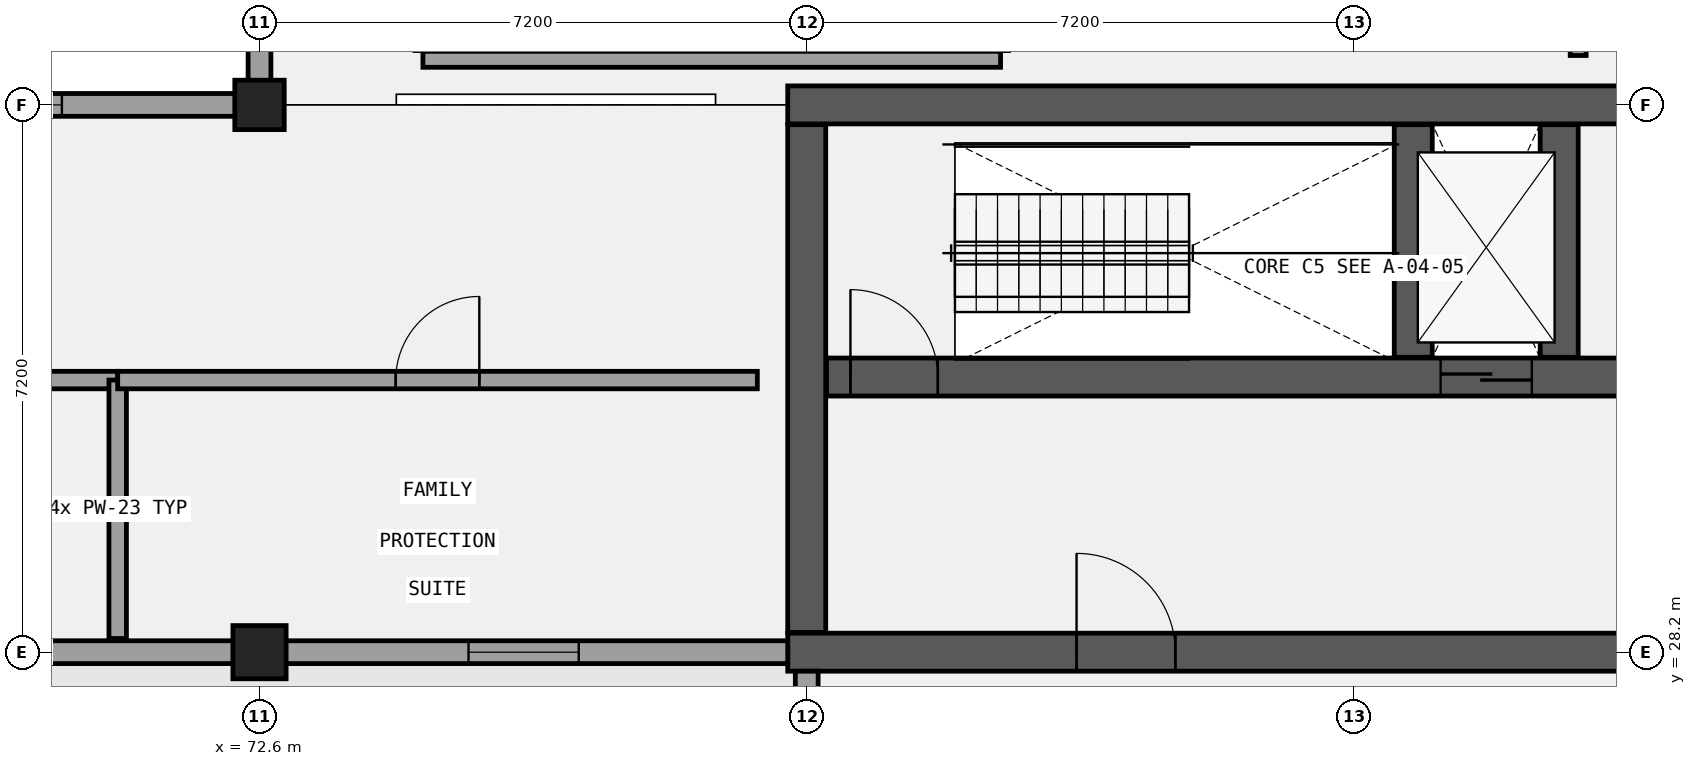
"""IFC4 building model, lengths in metres.
Left out: names, types, materials, properties, quantities, classifications, styles, units other than length and angle.
Written with IfcOpenShell. Run it as: python <this file> out.ifc"""

import sys

from ifc_helpers import new_model, si_unit, direction, frame, frame_2d, origin, origin_2d, place, context, subcontext, project, spatial, rectangle, circle, extrude, element, fill, save


model = new_model("IFC4")
c1 = context("Model", 3, precision=1e-05, world=origin(), true_north=direction((0.0, 1.0)))
c2 = subcontext(c1, "Body", "Model", "MODEL_VIEW")
j1 = project(units=[si_unit("LENGTHUNIT", "METRE"), si_unit("PLANEANGLEUNIT", "RADIAN")], contexts=[c1])
p1 = place(None, origin())
s1 = spatial("IfcSite", under=j1, at=p1, CompositionType="ELEMENT")
p2 = place(p1, origin())
s2 = spatial("IfcBuilding", under=s1, at=p2, CompositionType="ELEMENT")
p3 = place(p2, frame((0.0, 0.0, 5.4)))
s3 = spatial("IfcBuildingStorey", under=s2, at=p3, CompositionType="ELEMENT", Elevation=5.4)
p4 = place(p3, frame((79.55, 35.4, 0.0), z_axis=(0.0, 0.0, 1.0), x_axis=(1.0, 0.0, 0.0)))
e1 = element("IfcWall", 1, at=p4, inside=s3, PredefinedType="SHEAR", context=c2, shape_type="SweptSolid", body=[
    extrude(rectangle(XDim=14.9, YDim=0.5, at=frame_2d((7.45, 0.0))), origin(), (0.0, 0.0, 1.0), 4.2),
])
p5 = place(p3, frame((79.55, 28.2, 0.0), z_axis=(0.0, 0.0, 1.0), x_axis=(1.0, 0.0, 0.0)))
e2 = element("IfcWall", 2, at=p5, inside=s3, PredefinedType="SHEAR", context=c2, shape_type="SweptSolid", body=[
    extrude(rectangle(XDim=14.9, YDim=0.5, at=frame_2d((7.45, 0.0))), origin(), (0.0, 0.0, 1.0), 4.2),
])
p6 = place(p5, frame((3.8, 0.0, 0.0)))
e3 = element("IfcOpeningElement", 3, at=p6, cuts=e2, PredefinedType="OPENING", context=c2, shape_type="SweptSolid", body=[
    extrude(rectangle(XDim=1.3, YDim=2.2, at=frame_2d((0.65, 1.1))), frame((0.0, 0.26, 0.0), z_axis=(0.0, -1.0, 0.0), x_axis=(1.0, 0.0, 0.0)), (0.0, 0.0, 1.0), 0.52),
])
p7 = place(p3, frame((79.8, 28.46, 0.0), z_axis=(0.0, 0.0, 1.0), x_axis=(0.0, 1.0, 0.0)))
e4 = element("IfcWall", 4, at=p7, inside=s3, PredefinedType="SHEAR", context=c2, shape_type="SweptSolid", body=[
    extrude(rectangle(XDim=6.68, YDim=0.5, at=frame_2d((3.34, 0.0))), origin(), (0.0, 0.0, 1.0), 4.2),
])
p8 = place(p3, frame((80.06, 31.82, 0.0), z_axis=(0.0, 0.0, 1.0), x_axis=(1.0, 0.0, 0.0)))
e5 = element("IfcWall", 5, at=p8, inside=s3, PredefinedType="SHEAR", context=c2, shape_type="SweptSolid", body=[
    extrude(rectangle(XDim=13.88, YDim=0.5, at=frame_2d((6.94, 0.0))), origin(), (0.0, 0.0, 1.0), 4.2),
])
p9 = place(p8, frame((8.08, 0.0, 0.0)))
e6 = element("IfcOpeningElement", 6, at=p9, cuts=e5, PredefinedType="OPENING", context=c2, shape_type="SweptSolid", body=[
    extrude(rectangle(XDim=1.2, YDim=2.15, at=frame_2d((0.6, 1.075))), frame((0.0, 0.26, 0.0), z_axis=(0.0, -1.0, 0.0), x_axis=(1.0, 0.0, 0.0)), (0.0, 0.0, 1.0), 0.52),
])
p10 = place(p8, frame((0.315, 0.0, 0.0)))
e7 = element("IfcOpeningElement", 7, at=p10, cuts=e5, PredefinedType="OPENING", context=c2, shape_type="SweptSolid", body=[
    extrude(rectangle(XDim=1.15, YDim=2.15, at=frame_2d((0.575, 1.075))), frame((0.0, 0.26, 0.0), z_axis=(0.0, -1.0, 0.0), x_axis=(1.0, 0.0, 0.0)), (0.0, 0.0, 1.0), 0.52),
])
for number, where, z_axis, x_axis in (
    (8, (87.78, 32.08, 0.0), (0.0, 0.0, 1.0), (0.0, 1.0, 0.0)),
    (9, (89.7, 32.08, 0.0), (0.0, 0.0, 1.0), (0.0, 1.0, 0.0)),
):
    element("IfcWall", number, at=place(p3, frame(where, z_axis=z_axis, x_axis=x_axis)), inside=s3, PredefinedType="SHEAR", context=c2, shape_type="SweptSolid", body=[
        extrude(rectangle(XDim=3.06, YDim=0.5, at=frame_2d((1.53, 0.0))), origin(), (0.0, 0.0, 1.0), 4.2),
    ])
p11 = place(p3, frame((72.6, 28.2, 0.0), z_axis=(0.0, 0.0, 1.0), x_axis=(1.0, 0.0, 0.0)))
e10 = element("IfcColumn", 10, at=p11, inside=s3, PredefinedType="COLUMN", context=c2, shape_type="SweptSolid", body=[
    extrude(rectangle(XDim=0.7, YDim=0.7, at=origin_2d()), origin(), (0.0, 0.0, 1.0), 4.2),
])
p12 = place(p3, frame((72.6, 35.4, 0.0), z_axis=(0.0, 0.0, 1.0), x_axis=(1.0, 0.0, 0.0)))
e11 = element("IfcColumn", 11, at=p12, inside=s3, PredefinedType="COLUMN", context=c2, shape_type="SweptSolid", body=[
    extrude(circle(Radius=0.325, at=origin_2d()), origin(), (0.0, 0.0, 1.0), 4.2),
])
p13 = place(p3, frame((79.8, 27.95, 0.0), z_axis=(0.0, 0.0, 1.0), x_axis=(0.0, -1.0, 0.0)))
e12 = element("IfcWall", 12, at=p13, inside=s3, PredefinedType="SOLIDWALL", context=c2, shape_type="SweptSolid", body=[
    extrude(rectangle(XDim=21.2, YDim=0.3, at=frame_2d((10.6, 0.0))), origin(), (0.0, 0.0, 1.0), 3.27),
])
p14 = place(p13, frame((17.1, 0.0, 1.0)))
e13 = element("IfcOpeningElement", 13, at=p14, cuts=e12, PredefinedType="OPENING", context=c2, shape_type="SweptSolid", body=[
    extrude(rectangle(XDim=1.15, YDim=1.65, at=frame_2d((0.575, 0.825))), frame((0.0, 0.16, 0.0), z_axis=(0.0, -1.0, 0.0), x_axis=(1.0, 0.0, 0.0)), (0.0, 0.0, 1.0), 0.32),
])
p15 = place(p13, frame((9.975, 0.0, 1.0)))
e14 = element("IfcOpeningElement", 14, at=p15, cuts=e12, PredefinedType="OPENING", context=c2, shape_type="SweptSolid", body=[
    extrude(rectangle(XDim=1.15, YDim=1.65, at=frame_2d((0.575, 0.825))), frame((0.0, 0.16, 0.0), z_axis=(0.0, -1.0, 0.0), x_axis=(1.0, 0.0, 0.0)), (0.0, 0.0, 1.0), 0.32),
])
p16 = place(p13, frame((2.9, 0.0, 1.0)))
e15 = element("IfcOpeningElement", 15, at=p16, cuts=e12, PredefinedType="OPENING", context=c2, shape_type="SweptSolid", body=[
    extrude(rectangle(XDim=1.15, YDim=1.65, at=frame_2d((0.575, 0.825))), frame((0.0, 0.16, 0.0), z_axis=(0.0, -1.0, 0.0), x_axis=(1.0, 0.0, 0.0)), (0.0, 0.0, 1.0), 0.32),
])
p17 = place(p3, frame((29.25, 28.2, 0.0), z_axis=(0.0, 0.0, 1.0), x_axis=(1.0, 0.0, 0.0)))
e16 = element("IfcWall", 16, at=p17, inside=s3, PredefinedType="SOLIDWALL", context=c2, shape_type="SweptSolid", body=[
    extrude(rectangle(XDim=50.3, YDim=0.3, at=frame_2d((25.15, 0.0))), origin(), (0.0, 0.0, 1.0), 2.92),
])
p18 = place(p17, frame((3.025, 0.0, 1.0)))
e17 = element("IfcOpeningElement", 17, at=p18, cuts=e16, PredefinedType="OPENING", context=c2, shape_type="SweptSolid", body=[
    extrude(rectangle(XDim=1.45, YDim=1.65, at=frame_2d((0.725, 0.825))), frame((0.0, 0.16, 0.0), z_axis=(0.0, -1.0, 0.0), x_axis=(1.0, 0.0, 0.0)), (0.0, 0.0, 1.0), 0.32),
])
p19 = place(p17, frame((10.225, 0.0, 1.0)))
e18 = element("IfcOpeningElement", 18, at=p19, cuts=e16, PredefinedType="OPENING", context=c2, shape_type="SweptSolid", body=[
    extrude(rectangle(XDim=1.45, YDim=1.65, at=frame_2d((0.725, 0.825))), frame((0.0, 0.16, 0.0), z_axis=(0.0, -1.0, 0.0), x_axis=(1.0, 0.0, 0.0)), (0.0, 0.0, 1.0), 0.32),
])
p20 = place(p17, frame((17.425, 0.0, 1.0)))
e19 = element("IfcOpeningElement", 19, at=p20, cuts=e16, PredefinedType="OPENING", context=c2, shape_type="SweptSolid", body=[
    extrude(rectangle(XDim=1.45, YDim=1.65, at=frame_2d((0.725, 0.825))), frame((0.0, 0.16, 0.0), z_axis=(0.0, -1.0, 0.0), x_axis=(1.0, 0.0, 0.0)), (0.0, 0.0, 1.0), 0.32),
])
p21 = place(p17, frame((24.625, 0.0, 1.0)))
e20 = element("IfcOpeningElement", 20, at=p21, cuts=e16, PredefinedType="OPENING", context=c2, shape_type="SweptSolid", body=[
    extrude(rectangle(XDim=1.45, YDim=1.65, at=frame_2d((0.725, 0.825))), frame((0.0, 0.16, 0.0), z_axis=(0.0, -1.0, 0.0), x_axis=(1.0, 0.0, 0.0)), (0.0, 0.0, 1.0), 0.32),
])
p22 = place(p17, frame((31.825, 0.0, 1.0)))
e21 = element("IfcOpeningElement", 21, at=p22, cuts=e16, PredefinedType="OPENING", context=c2, shape_type="SweptSolid", body=[
    extrude(rectangle(XDim=1.45, YDim=1.65, at=frame_2d((0.725, 0.825))), frame((0.0, 0.16, 0.0), z_axis=(0.0, -1.0, 0.0), x_axis=(1.0, 0.0, 0.0)), (0.0, 0.0, 1.0), 0.32),
])
p23 = place(p17, frame((39.025, 0.0, 1.0)))
e22 = element("IfcOpeningElement", 22, at=p23, cuts=e16, PredefinedType="OPENING", context=c2, shape_type="SweptSolid", body=[
    extrude(rectangle(XDim=1.45, YDim=1.65, at=frame_2d((0.725, 0.825))), frame((0.0, 0.16, 0.0), z_axis=(0.0, -1.0, 0.0), x_axis=(1.0, 0.0, 0.0)), (0.0, 0.0, 1.0), 0.32),
])
p24 = place(p17, frame((46.1, 0.0, 1.0)))
e23 = element("IfcOpeningElement", 23, at=p24, cuts=e16, PredefinedType="OPENING", context=c2, shape_type="SweptSolid", body=[
    extrude(rectangle(XDim=1.45, YDim=1.65, at=frame_2d((0.725, 0.825))), frame((0.0, 0.16, 0.0), z_axis=(0.0, -1.0, 0.0), x_axis=(1.0, 0.0, 0.0)), (0.0, 0.0, 1.0), 0.32),
])
p25 = place(p3, frame((72.6, 78.45, 0.0), z_axis=(0.0, 0.0, 1.0), x_axis=(0.0, -1.0, 0.0)))
e24 = element("IfcWall", 24, at=p25, inside=s3, PredefinedType="SOLIDWALL", context=c2, shape_type="SweptSolid", body=[
    extrude(rectangle(XDim=42.9, YDim=0.3, at=frame_2d((21.45, 0.0))), origin(), (0.0, 0.0, 1.0), 2.72),
])
p26 = place(p25, frame((38.65, 0.0, 1.0)))
e25 = element("IfcOpeningElement", 25, at=p26, cuts=e24, PredefinedType="OPENING", context=c2, shape_type="SweptSolid", body=[
    extrude(rectangle(XDim=1.45, YDim=1.4, at=frame_2d((0.725, 0.7))), frame((0.0, 0.16, 0.0), z_axis=(0.0, -1.0, 0.0), x_axis=(1.0, 0.0, 0.0)), (0.0, 0.0, 1.0), 0.32),
])
p27 = place(p25, frame((31.525, 0.0, 1.0)))
e26 = element("IfcOpeningElement", 26, at=p27, cuts=e24, PredefinedType="OPENING", context=c2, shape_type="SweptSolid", body=[
    extrude(rectangle(XDim=1.45, YDim=1.4, at=frame_2d((0.725, 0.7))), frame((0.0, 0.16, 0.0), z_axis=(0.0, -1.0, 0.0), x_axis=(1.0, 0.0, 0.0)), (0.0, 0.0, 1.0), 0.32),
])
p28 = place(p25, frame((24.325, 0.0, 1.0)))
e27 = element("IfcOpeningElement", 27, at=p28, cuts=e24, PredefinedType="OPENING", context=c2, shape_type="SweptSolid", body=[
    extrude(rectangle(XDim=1.45, YDim=1.4, at=frame_2d((0.725, 0.7))), frame((0.0, 0.16, 0.0), z_axis=(0.0, -1.0, 0.0), x_axis=(1.0, 0.0, 0.0)), (0.0, 0.0, 1.0), 0.32),
])
p29 = place(p25, frame((17.125, 0.0, 1.0)))
e28 = element("IfcOpeningElement", 28, at=p29, cuts=e24, PredefinedType="OPENING", context=c2, shape_type="SweptSolid", body=[
    extrude(rectangle(XDim=1.45, YDim=1.4, at=frame_2d((0.725, 0.7))), frame((0.0, 0.16, 0.0), z_axis=(0.0, -1.0, 0.0), x_axis=(1.0, 0.0, 0.0)), (0.0, 0.0, 1.0), 0.32),
])
p30 = place(p25, frame((9.925, 0.0, 1.0)))
e29 = element("IfcOpeningElement", 29, at=p30, cuts=e24, PredefinedType="OPENING", context=c2, shape_type="SweptSolid", body=[
    extrude(rectangle(XDim=1.45, YDim=1.4, at=frame_2d((0.725, 0.7))), frame((0.0, 0.16, 0.0), z_axis=(0.0, -1.0, 0.0), x_axis=(1.0, 0.0, 0.0)), (0.0, 0.0, 1.0), 0.32),
])
p31 = place(p25, frame((2.8, 0.0, 1.0)))
e30 = element("IfcOpeningElement", 30, at=p31, cuts=e24, PredefinedType="OPENING", context=c2, shape_type="SweptSolid", body=[
    extrude(rectangle(XDim=1.45, YDim=1.4, at=frame_2d((0.725, 0.7))), frame((0.0, 0.16, 0.0), z_axis=(0.0, -1.0, 0.0), x_axis=(1.0, 0.0, 0.0)), (0.0, 0.0, 1.0), 0.32),
])
p32 = place(p3, frame((72.75, 35.4, 0.0), z_axis=(0.0, 0.0, 1.0), x_axis=(-1.0, 0.0, 0.0)))
e31 = element("IfcWall", 31, at=p32, inside=s3, PredefinedType="SOLIDWALL", context=c2, shape_type="SweptSolid", body=[
    extrude(rectangle(XDim=43.5, YDim=0.3, at=frame_2d((21.75, 0.0))), origin(), (0.0, 0.0, 1.0), 2.92),
])
p33 = place(p32, frame((38.75, 0.0, 1.0)))
e32 = element("IfcOpeningElement", 32, at=p33, cuts=e31, PredefinedType="OPENING", context=c2, shape_type="SweptSolid", body=[
    extrude(rectangle(XDim=2.0, YDim=1.4, at=frame_2d((1.0, 0.7))), frame((0.0, 0.16, 0.0), z_axis=(0.0, -1.0, 0.0), x_axis=(1.0, 0.0, 0.0)), (0.0, 0.0, 1.0), 0.32),
])
p34 = place(p32, frame((31.55, 0.0, 1.0)))
e33 = element("IfcOpeningElement", 33, at=p34, cuts=e31, PredefinedType="OPENING", context=c2, shape_type="SweptSolid", body=[
    extrude(rectangle(XDim=2.0, YDim=1.4, at=frame_2d((1.0, 0.7))), frame((0.0, 0.16, 0.0), z_axis=(0.0, -1.0, 0.0), x_axis=(1.0, 0.0, 0.0)), (0.0, 0.0, 1.0), 0.32),
])
p35 = place(p32, frame((24.35, 0.0, 1.0)))
e34 = element("IfcOpeningElement", 34, at=p35, cuts=e31, PredefinedType="OPENING", context=c2, shape_type="SweptSolid", body=[
    extrude(rectangle(XDim=2.0, YDim=1.4, at=frame_2d((1.0, 0.7))), frame((0.0, 0.16, 0.0), z_axis=(0.0, -1.0, 0.0), x_axis=(1.0, 0.0, 0.0)), (0.0, 0.0, 1.0), 0.32),
])
p36 = place(p32, frame((17.15, 0.0, 1.0)))
e35 = element("IfcOpeningElement", 35, at=p36, cuts=e31, PredefinedType="OPENING", context=c2, shape_type="SweptSolid", body=[
    extrude(rectangle(XDim=2.0, YDim=1.4, at=frame_2d((1.0, 0.7))), frame((0.0, 0.16, 0.0), z_axis=(0.0, -1.0, 0.0), x_axis=(1.0, 0.0, 0.0)), (0.0, 0.0, 1.0), 0.32),
])
p37 = place(p32, frame((9.95, 0.0, 1.0)))
e36 = element("IfcOpeningElement", 36, at=p37, cuts=e31, PredefinedType="OPENING", context=c2, shape_type="SweptSolid", body=[
    extrude(rectangle(XDim=2.0, YDim=1.4, at=frame_2d((1.0, 0.7))), frame((0.0, 0.16, 0.0), z_axis=(0.0, -1.0, 0.0), x_axis=(1.0, 0.0, 0.0)), (0.0, 0.0, 1.0), 0.32),
])
p38 = place(p32, frame((2.75, 0.0, 1.0)))
e37 = element("IfcOpeningElement", 37, at=p38, cuts=e31, PredefinedType="OPENING", context=c2, shape_type="SweptSolid", body=[
    extrude(rectangle(XDim=2.0, YDim=1.4, at=frame_2d((1.0, 0.7))), frame((0.0, 0.16, 0.0), z_axis=(0.0, -1.0, 0.0), x_axis=(1.0, 0.0, 0.0)), (0.0, 0.0, 1.0), 0.32),
])
p39 = place(p3, frame((74.75, 36.0, 0.0), z_axis=(0.0, 0.0, 1.0), x_axis=(1.0, 0.0, 0.0)))
e38 = element("IfcWall", 38, at=p39, inside=s3, PredefinedType="PARTITIONING", context=c2, shape_type="SweptSolid", body=[
    extrude(rectangle(XDim=7.6, YDim=0.21, at=frame_2d((3.8, 0.0))), origin(), (0.0, 0.0, 1.0), 3.92),
])
p40 = place(p3, frame((89.95, 36.05, 0.0), z_axis=(0.0, 0.0, 1.0), x_axis=(0.0, 1.0, 0.0)))
e39 = element("IfcWall", 39, at=p40, inside=s3, PredefinedType="PARTITIONING", context=c2, shape_type="SweptSolid", body=[
    extrude(rectangle(XDim=3.38, YDim=0.21, at=frame_2d((1.69, 0.0))), origin(), (0.0, 0.0, 1.0), 3.92),
])
p41 = place(p3, frame((59.418, 31.78, 0.0), z_axis=(0.0, 0.0, 1.0), x_axis=(1.0, 0.0, 0.0)))
e40 = element("IfcWall", 40, at=p41, inside=s3, PredefinedType="PARTITIONING", context=c2, shape_type="SweptSolid", body=[
    extrude(rectangle(XDim=11.316, YDim=0.23, at=frame_2d((5.658, 0.0))), origin(), (0.0, 0.0, 1.0), 3.37),
])
p42 = place(p41, frame((5.108, 0.0, 0.0)))
e41 = element("IfcOpeningElement", 41, at=p42, cuts=e40, PredefinedType="OPENING", context=c2, shape_type="SweptSolid", body=[
    extrude(rectangle(XDim=1.1, YDim=2.1, at=frame_2d((0.55, 1.05))), frame((0.0, 0.125, 0.0), z_axis=(0.0, -1.0, 0.0), x_axis=(1.0, 0.0, 0.0)), (0.0, 0.0, 1.0), 0.25),
])
p43 = place(p3, frame((70.734, 28.38, 0.0), z_axis=(0.0, 0.0, 1.0), x_axis=(0.0, 1.0, 0.0)))
e42 = element("IfcWall", 42, at=p43, inside=s3, PredefinedType="PARTITIONING", context=c2, shape_type="SweptSolid", body=[
    extrude(rectangle(XDim=3.4, YDim=0.23, at=frame_2d((1.7, 0.0))), origin(), (0.0, 0.0, 1.0), 3.92),
])
p44 = place(p3, frame((70.734, 31.78, 0.0), z_axis=(0.0, 0.0, 1.0), x_axis=(1.0, 0.0, 0.0)))
e43 = element("IfcWall", 43, at=p44, inside=s3, PredefinedType="PARTITIONING", context=c2, shape_type="SweptSolid", body=[
    extrude(rectangle(XDim=8.416, YDim=0.23, at=frame_2d((4.208, 0.0))), origin(), (0.0, 0.0, 1.0), 3.37),
])
p45 = place(p44, frame((3.658, 0.0, 0.0)))
e44 = element("IfcOpeningElement", 44, at=p45, cuts=e43, PredefinedType="OPENING", context=c2, shape_type="SweptSolid", body=[
    extrude(rectangle(XDim=1.1, YDim=2.22, at=frame_2d((0.55, 1.11))), frame((0.0, 0.125, 0.0), z_axis=(0.0, -1.0, 0.0), x_axis=(1.0, 0.0, 0.0)), (0.0, 0.0, 1.0), 0.25),
])
p46 = place(p9, frame((1.2, 0.0, 0.0), z_axis=(0.0, 0.0, 1.0), x_axis=(-1.0, 0.0, 0.0)))
e45 = element("IfcDoor", 45, at=p46, inside=s3, OperationType="DOUBLE_DOOR_SLIDING", PredefinedType="DOOR", context=c2, shape_type="SweptSolid", body=[
    extrude(rectangle(XDim=1.2, YDim=2.15, at=frame_2d((0.6, 1.075))), frame((0.0, 0.025, 0.0), z_axis=(0.0, -1.0, 0.0), x_axis=(1.0, 0.0, 0.0)), (0.0, 0.0, 1.0), 0.05),
])
fill(e6, e45)
p47 = place(p10, origin())
e46 = element("IfcDoor", 46, at=p47, inside=s3, OperationType="SINGLE_SWING_LEFT", PredefinedType="DOOR", context=c2, shape_type="SweptSolid", body=[
    extrude(rectangle(XDim=1.15, YDim=2.15, at=frame_2d((0.575, 1.075))), frame((0.0, 0.025, 0.0), z_axis=(0.0, -1.0, 0.0), x_axis=(1.0, 0.0, 0.0)), (0.0, 0.0, 1.0), 0.05),
])
fill(e7, e46)
p48 = place(p6, frame((1.3, 0.0, 0.0), z_axis=(0.0, 0.0, 1.0), x_axis=(-1.0, 0.0, 0.0)))
e47 = element("IfcDoor", 47, at=p48, inside=s3, OperationType="SINGLE_SWING_LEFT", PredefinedType="DOOR", context=c2, shape_type="SweptSolid", body=[
    extrude(rectangle(XDim=1.3, YDim=2.2, at=frame_2d((0.65, 1.1))), frame((0.0, 0.025, 0.0), z_axis=(0.0, -1.0, 0.0), x_axis=(1.0, 0.0, 0.0)), (0.0, 0.0, 1.0), 0.05),
])
fill(e3, e47)
p49 = place(p24, origin())
e48 = element("IfcWindow", 48, at=p49, inside=s3, PartitioningType="SINGLE_PANEL", PredefinedType="WINDOW", context=c2, shape_type="SweptSolid", body=[
    extrude(rectangle(XDim=1.45, YDim=1.65, at=frame_2d((0.725, 0.825))), frame((0.0, 0.03, 0.0), z_axis=(0.0, -1.0, 0.0), x_axis=(1.0, 0.0, 0.0)), (0.0, 0.0, 1.0), 0.06),
])
fill(e23, e48)
p50 = place(p38, origin())
e49 = element("IfcWindow", 49, at=p50, inside=s3, PartitioningType="SINGLE_PANEL", PredefinedType="WINDOW", context=c2, shape_type="SweptSolid", body=[
    extrude(rectangle(XDim=2.0, YDim=1.4, at=frame_2d((1.0, 0.7))), frame((0.0, 0.03, 0.0), z_axis=(0.0, -1.0, 0.0), x_axis=(1.0, 0.0, 0.0)), (0.0, 0.0, 1.0), 0.06),
])
fill(e37, e49)
p51 = place(p45, frame((1.1, 0.0, 0.0), z_axis=(0.0, 0.0, 1.0), x_axis=(-1.0, 0.0, 0.0)))
e50 = element("IfcDoor", 50, at=p51, inside=s3, OperationType="SINGLE_SWING_RIGHT", PredefinedType="DOOR", context=c2, shape_type="SweptSolid", body=[
    extrude(rectangle(XDim=1.1, YDim=2.22, at=frame_2d((0.55, 1.11))), frame((0.0, 0.025, 0.0), z_axis=(0.0, -1.0, 0.0), x_axis=(1.0, 0.0, 0.0)), (0.0, 0.0, 1.0), 0.05),
])
fill(e44, e50)
save(model, sys.argv[1])
